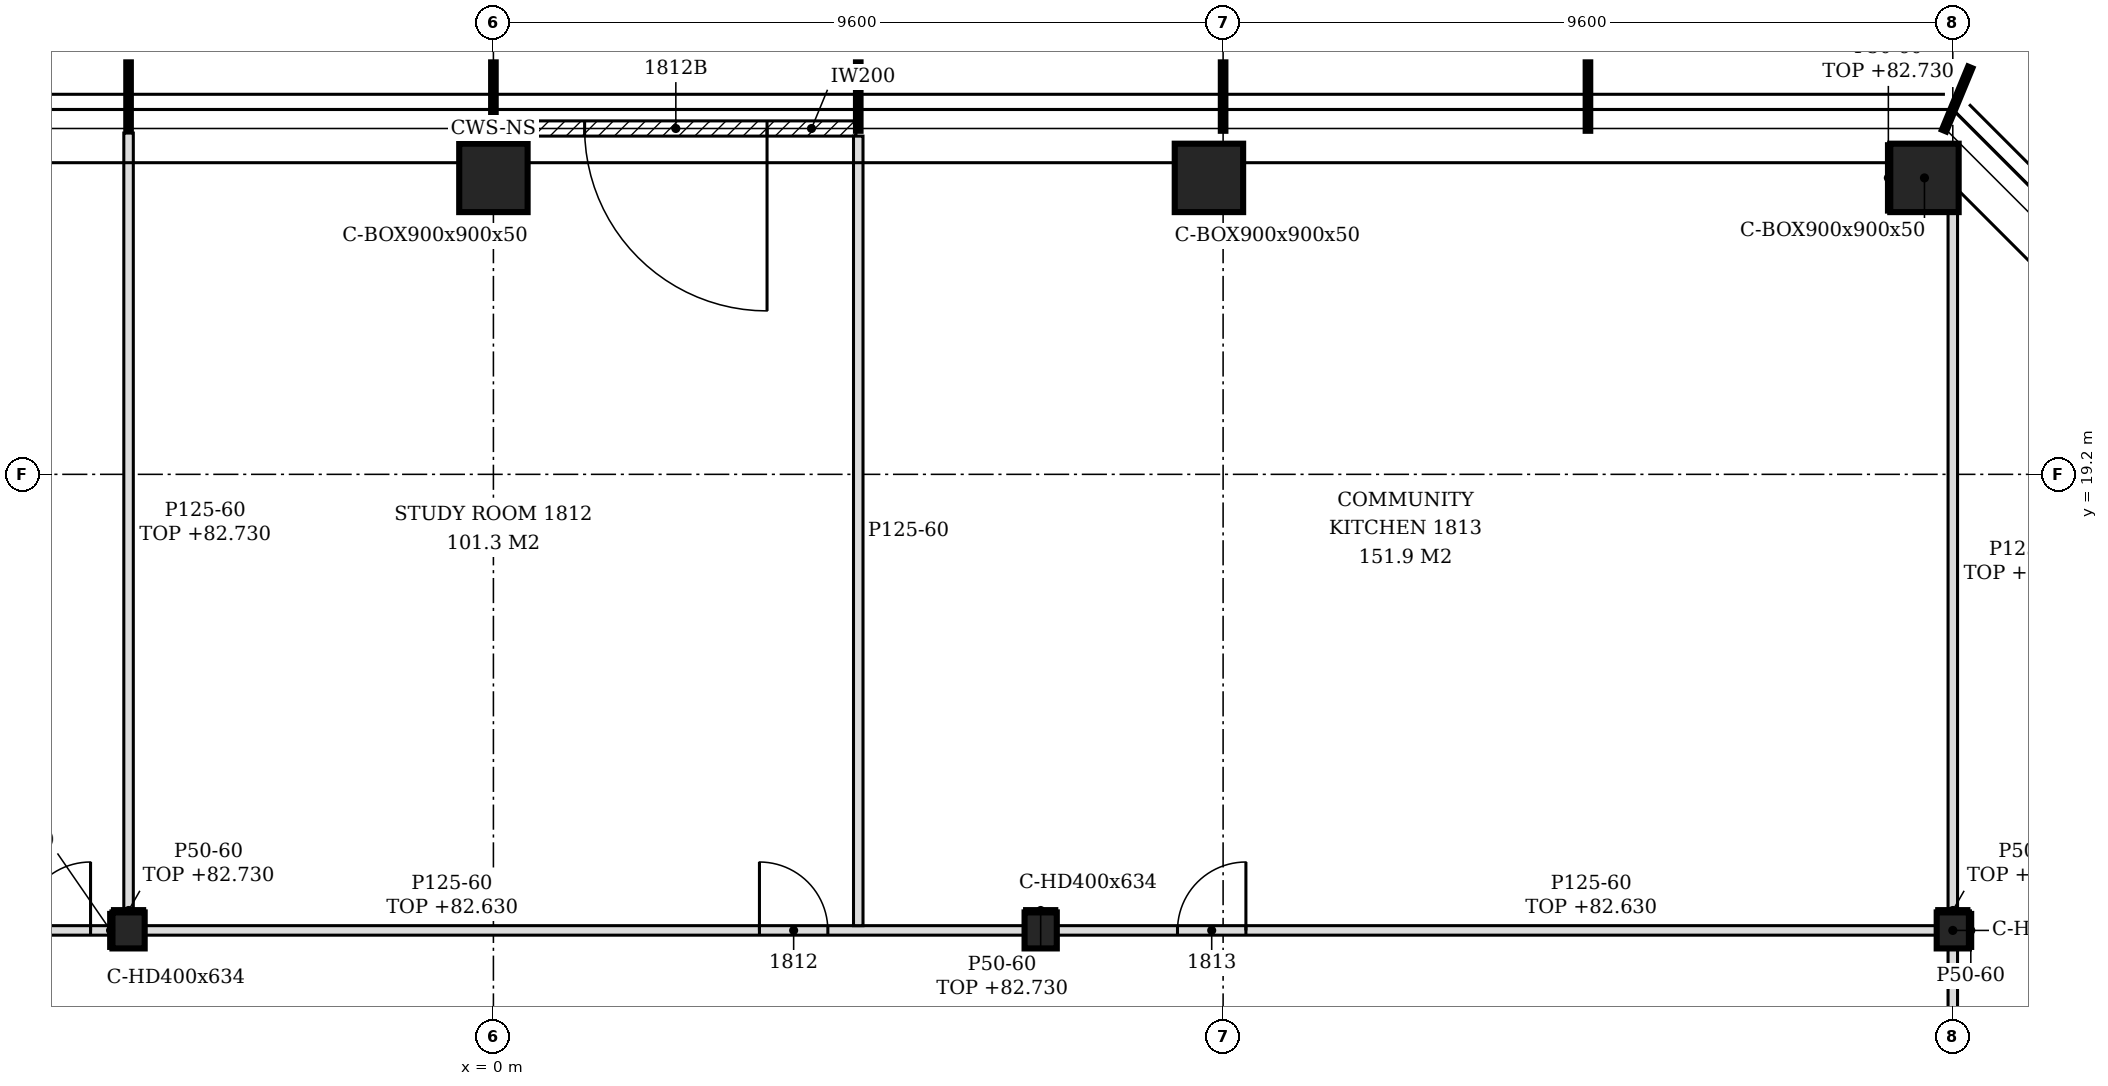
"""IFC4 building model, lengths in metres.
Left out: names, types, materials, properties, quantities, classifications, styles, units other than length and angle.
Written with IfcOpenShell. Run it as: python <this file> out.ifc"""

import sys

from ifc_helpers import new_model, si_unit, direction, frame, frame_2d, origin, origin_2d, place, context, subcontext, project, spatial, polyline, rectangle, hollow_rectangle, i_section, outline, extrude, element, fill, save


model = new_model("IFC4")
c1 = context("Model", 3, precision=1e-05, world=origin(), true_north=direction((0.0, 1.0)))
c2 = subcontext(c1, "Body", "Model", "MODEL_VIEW")
j1 = project(units=[si_unit("LENGTHUNIT", "METRE"), si_unit("PLANEANGLEUNIT", "RADIAN")], contexts=[c1])
p1 = place(None, origin())
s1 = spatial("IfcSite", under=j1, at=p1, CompositionType="ELEMENT")
p2 = place(p1, origin())
s2 = spatial("IfcBuilding", under=s1, at=p2, CompositionType="ELEMENT")
p3 = place(p2, frame((0.0, 0.0, 79.8)))
s3 = spatial("IfcBuildingStorey", under=s2, at=p3, CompositionType="ELEMENT", Elevation=79.8)
for number, where, z_axis, x_axis in (
    (1, (18.827, 23.1, -0.15), (0.0, 0.0, 1.0), (1.0, 0.0, 0.0)),
    (2, (9.414, 23.1, -0.15), (0.0, 0.0, 1.0), (1.0, 0.0, 0.0)),
    (3, (0.0, 23.1, -0.15), (0.0, 0.0, 1.0), (1.0, 0.0, 0.0)),
):
    element("IfcColumn", number, at=place(p3, frame(where, z_axis=z_axis, x_axis=x_axis)), inside=s3, PredefinedType="COLUMN", context=c2, shape_type="SweptSolid", body=[
        extrude(hollow_rectangle(XDim=0.9, YDim=0.9, WallThickness=0.05, at=origin_2d()), origin(), (0.0, 0.0, 1.0), 3.6),
    ])
for number, where, z_axis, x_axis in (
    (4, (-4.8, 13.2, -0.15), (0.0, 0.0, 1.0), (1.0, 0.0, 0.0)),
    (5, (7.2, 13.2, -0.15), (0.0, 0.0, 1.0), (1.0, 0.0, 0.0)),
    (6, (19.2, 13.2, -0.15), (0.0, 0.0, 1.0), (1.0, 0.0, 0.0)),
):
    element("IfcColumn", number, at=place(p3, frame(where, z_axis=z_axis, x_axis=x_axis)), inside=s3, PredefinedType="COLUMN", context=c2, shape_type="SweptSolid", body=[
        extrude(i_section(OverallWidth=0.424, OverallDepth=0.474, WebThickness=0.048, FlangeThickness=0.077, FilletRadius=0.015, at=origin_2d()), origin(), (0.0, 0.0, 1.0), 3.6),
    ])
p4 = place(p3, frame((4.77, 23.75, 0.0), z_axis=(0.0, 0.0, 1.0), x_axis=(-1.0, 0.0, 0.0)))
e7 = element("IfcWall", 7, at=p4, inside=s3, PredefinedType="NOTDEFINED", context=c2, shape_type="SweptSolid", body=[
    extrude(rectangle(XDim=4.74, YDim=0.2, at=frame_2d((2.37, 0.0))), origin(), (0.0, 0.0, 1.0), 3.45),
])
p5 = place(p4, frame((1.17, 0.0, 0.0)))
e8 = element("IfcOpeningElement", 8, at=p5, cuts=e7, PredefinedType="OPENING", context=c2, shape_type="SweptSolid", body=[
    extrude(rectangle(XDim=2.4, YDim=2.4, at=frame_2d((1.2, 1.2))), frame((0.0, 0.11, 0.0), z_axis=(0.0, -1.0, 0.0), x_axis=(1.0, 0.0, 0.0)), (0.0, 0.0, 1.0), 0.22),
])
p6 = place(p3, frame((19.2, 2.637, 0.0), z_axis=(0.0, 0.0, 1.0), x_axis=(0.0, 1.0, 0.0)))
e9 = element("IfcWall", 9, at=p6, inside=s3, PredefinedType="PARTITIONING", context=c2, shape_type="SweptSolid", body=[
    extrude(rectangle(XDim=10.326, YDim=0.125, at=frame_2d((5.163, 0.0))), origin(), (0.0, 0.0, 1.0), 2.83),
])
p7 = place(p6, frame((5.763, 0.0, 0.0)))
e10 = element("IfcOpeningElement", 10, at=p7, cuts=e9, PredefinedType="OPENING", context=c2, shape_type="SweptSolid", body=[
    extrude(rectangle(XDim=0.9, YDim=2.1, at=frame_2d((0.45, 1.05))), frame((0.0, 0.073, 0.0), z_axis=(0.0, -1.0, 0.0), x_axis=(1.0, 0.0, 0.0)), (0.0, 0.0, 1.0), 0.145),
])
p8 = place(p3, frame((-18.413, 13.2, 0.0), z_axis=(0.0, 0.0, 1.0), x_axis=(1.0, 0.0, 0.0)))
e11 = element("IfcWall", 11, at=p8, inside=s3, PredefinedType="PARTITIONING", context=c2, shape_type="SweptSolid", body=[
    extrude(outline(polyline([(0.0, 0.0), (13.401, 0.0), (13.4, 3.45), (4.163, 3.45), (4.16, 2.93), (3.863, 2.93), (3.861, 3.45), (0.0, 3.45), (0.0, 0.0)])), frame((0.0, 0.062, 0.0), z_axis=(0.0, -1.0, 0.0), x_axis=(1.0, 0.0, 0.0)), (0.0, 0.0, 1.0), 0.125),
])
p9 = place(p8, frame((11.312, 0.0, 0.0)))
e12 = element("IfcOpeningElement", 12, at=p9, cuts=e11, PredefinedType="OPENING", context=c2, shape_type="SweptSolid", body=[
    extrude(rectangle(XDim=1.8, YDim=2.1, at=frame_2d((0.9, 1.05))), frame((0.0, 0.073, 0.0), z_axis=(0.0, -1.0, 0.0), x_axis=(1.0, 0.0, 0.0)), (0.0, 0.0, 1.0), 0.145),
])
p10 = place(p3, frame((-4.588, 13.2, 0.0), z_axis=(0.0, 0.0, 1.0), x_axis=(1.0, 0.0, 0.0)))
e13 = element("IfcWall", 13, at=p10, inside=s3, PredefinedType="PARTITIONING", context=c2, shape_type="SweptSolid", body=[
    extrude(rectangle(XDim=11.576, YDim=0.125, at=frame_2d((5.788, 0.0))), origin(), (0.0, 0.0, 1.0), 2.83),
])
p11 = place(p10, frame((8.088, 0.0, 0.0)))
e14 = element("IfcOpeningElement", 14, at=p11, cuts=e13, PredefinedType="OPENING", context=c2, shape_type="SweptSolid", body=[
    extrude(rectangle(XDim=0.9, YDim=2.1, at=frame_2d((0.45, 1.05))), frame((0.0, 0.073, 0.0), z_axis=(0.0, -1.0, 0.0), x_axis=(1.0, 0.0, 0.0)), (0.0, 0.0, 1.0), 0.145),
])
p12 = place(p3, frame((7.412, 13.2, 0.0), z_axis=(0.0, 0.0, 1.0), x_axis=(1.0, 0.0, 0.0)))
e15 = element("IfcWall", 15, at=p12, inside=s3, PredefinedType="PARTITIONING", context=c2, shape_type="SweptSolid", body=[
    extrude(rectangle(XDim=11.576, YDim=0.125, at=frame_2d((5.788, 0.0))), origin(), (0.0, 0.0, 1.0), 2.83),
])
p13 = place(p12, frame((1.588, 0.0, 0.0)))
e16 = element("IfcOpeningElement", 16, at=p13, cuts=e15, PredefinedType="OPENING", context=c2, shape_type="SweptSolid", body=[
    extrude(rectangle(XDim=0.9, YDim=2.1, at=frame_2d((0.45, 1.05))), frame((0.0, 0.073, 0.0), z_axis=(0.0, -1.0, 0.0), x_axis=(1.0, 0.0, 0.0)), (0.0, 0.0, 1.0), 0.145),
])
p14 = place(p3, frame((4.8, 13.262, 0.0), z_axis=(0.0, 0.0, 1.0), x_axis=(0.0, 1.0, 0.0)))
e17 = element("IfcWall", 17, at=p14, inside=s3, PredefinedType="PARTITIONING", context=c2, shape_type="SweptSolid", body=[
    extrude(outline(polyline([(0.0, 0.0), (10.387, 0.0), (10.387, 3.45), (9.988, 3.45), (9.986, 2.93), (9.688, 2.93), (9.686, 3.45), (6.042, 3.45), (6.041, 2.88), (5.833, 2.88), (5.831, 3.45), (0.087, 3.45), (0.085, 2.83), (0.0, 2.83), (0.0, 0.0)])), frame((0.0, 0.062, 0.0), z_axis=(0.0, -1.0, 0.0), x_axis=(1.0, 0.0, 0.0)), (0.0, 0.0, 1.0), 0.125),
])
p15 = place(p3, frame((-4.8, 13.437, 0.0), z_axis=(0.0, 0.0, 1.0), x_axis=(0.0, 1.0, 0.0)))
e18 = element("IfcWall", 18, at=p15, inside=s3, PredefinedType="PARTITIONING", context=c2, shape_type="SweptSolid", body=[
    extrude(rectangle(XDim=10.253, YDim=0.125, at=frame_2d((5.126, 0.0))), origin(), (0.0, 0.0, 1.0), 2.93),
])
p16 = place(p3, frame((19.2, 13.437, 0.0), z_axis=(0.0, 0.0, 1.0), x_axis=(0.0, 1.0, 0.0)))
e19 = element("IfcWall", 19, at=p16, inside=s3, PredefinedType="PARTITIONING", context=c2, shape_type="SweptSolid", body=[
    extrude(outline(polyline([(0.0, 0.0), (9.213, 0.0), (9.213, 2.63), (8.733, 2.63), (8.731, 2.93), (0.0, 2.93), (0.0, 0.0)])), frame((0.0, 0.062, 0.0), z_axis=(0.0, -1.0, 0.0), x_axis=(1.0, 0.0, 0.0)), (0.0, 0.0, 1.0), 0.125),
])
p17 = place(p3, frame((19.437, 12.963, 0.0), z_axis=(0.0, 0.0, 1.0), x_axis=(0.0, 1.0, 0.0)))
e20 = element("IfcWall", 20, at=p17, inside=s3, PredefinedType="PARTITIONING", context=c2, shape_type="SweptSolid", body=[
    extrude(rectangle(XDim=0.474, YDim=0.05, at=frame_2d((0.237, 0.0))), origin(), (0.0, 0.0, 1.0), 3.45),
])
for number, where, z_axis, x_axis in (
    (21, (-5.012, 13.462, 0.0), (0.0, 0.0, 1.0), (1.0, 0.0, 0.0)),
    (22, (6.988, 13.462, 0.0), (0.0, 0.0, 1.0), (1.0, 0.0, 0.0)),
    (23, (18.988, 13.462, 0.0), (0.0, 0.0, 1.0), (1.0, 0.0, 0.0)),
):
    element("IfcWall", number, at=place(p3, frame(where, z_axis=z_axis, x_axis=x_axis)), inside=s3, PredefinedType="PARTITIONING", context=c2, shape_type="SweptSolid", body=[
        extrude(rectangle(XDim=0.424, YDim=0.05, at=frame_2d((0.212, 0.0))), origin(), (0.0, 0.0, 1.0), 2.93),
    ])
p18 = place(p3, frame((18.352, 22.65, 0.0), z_axis=(0.0, 0.0, 1.0), x_axis=(0.0, 1.0, 0.0)))
e24 = element("IfcWall", 24, at=p18, inside=s3, PredefinedType="PARTITIONING", context=c2, shape_type="SweptSolid", body=[
    extrude(rectangle(XDim=0.9, YDim=0.05, at=frame_2d((0.45, 0.0))), origin(), (0.0, 0.0, 1.0), 2.93),
])
p19 = place(p3, frame((-5.037, 12.963, 0.0), z_axis=(0.0, 0.0, 1.0), x_axis=(0.0, 1.0, 0.0)))
e25 = element("IfcWall", 25, at=p19, inside=s3, PredefinedType="PARTITIONING", context=c2, shape_type="SweptSolid", body=[
    extrude(rectangle(XDim=0.474, YDim=0.05, at=frame_2d((0.237, 0.0))), origin(), (0.0, 0.0, 1.0), 3.45),
])
p20 = place(p5, origin())
e26 = element("IfcDoor", 26, at=p20, inside=s3, OperationType="SINGLE_SWING_LEFT", PredefinedType="DOOR", context=c2, shape_type="SweptSolid", body=[
    extrude(rectangle(XDim=2.4, YDim=2.4, at=frame_2d((1.2, 1.2))), frame((0.0, 0.025, 0.0), z_axis=(0.0, -1.0, 0.0), x_axis=(1.0, 0.0, 0.0)), (0.0, 0.0, 1.0), 0.05),
])
fill(e8, e26)
p21 = place(p9, origin())
e27 = element("IfcDoor", 27, at=p21, inside=s3, OperationType="DOUBLE_DOOR_SINGLE_SWING", PredefinedType="DOOR", context=c2, shape_type="SweptSolid", body=[
    extrude(rectangle(XDim=1.8, YDim=2.1, at=frame_2d((0.9, 1.05))), frame((0.0, 0.025, 0.0), z_axis=(0.0, -1.0, 0.0), x_axis=(1.0, 0.0, 0.0)), (0.0, 0.0, 1.0), 0.05),
])
fill(e12, e27)
p22 = place(p11, origin())
e28 = element("IfcDoor", 28, at=p22, inside=s3, OperationType="SINGLE_SWING_LEFT", PredefinedType="DOOR", context=c2, shape_type="SweptSolid", body=[
    extrude(rectangle(XDim=0.9, YDim=2.1, at=frame_2d((0.45, 1.05))), frame((0.0, 0.025, 0.0), z_axis=(0.0, -1.0, 0.0), x_axis=(1.0, 0.0, 0.0)), (0.0, 0.0, 1.0), 0.05),
])
fill(e14, e28)
p23 = place(p13, origin())
e29 = element("IfcDoor", 29, at=p23, inside=s3, OperationType="SINGLE_SWING_RIGHT", PredefinedType="DOOR", context=c2, shape_type="SweptSolid", body=[
    extrude(rectangle(XDim=0.9, YDim=2.1, at=frame_2d((0.45, 1.05))), frame((0.0, 0.025, 0.0), z_axis=(0.0, -1.0, 0.0), x_axis=(1.0, 0.0, 0.0)), (0.0, 0.0, 1.0), 0.05),
])
fill(e16, e29)
save(model, sys.argv[1])
